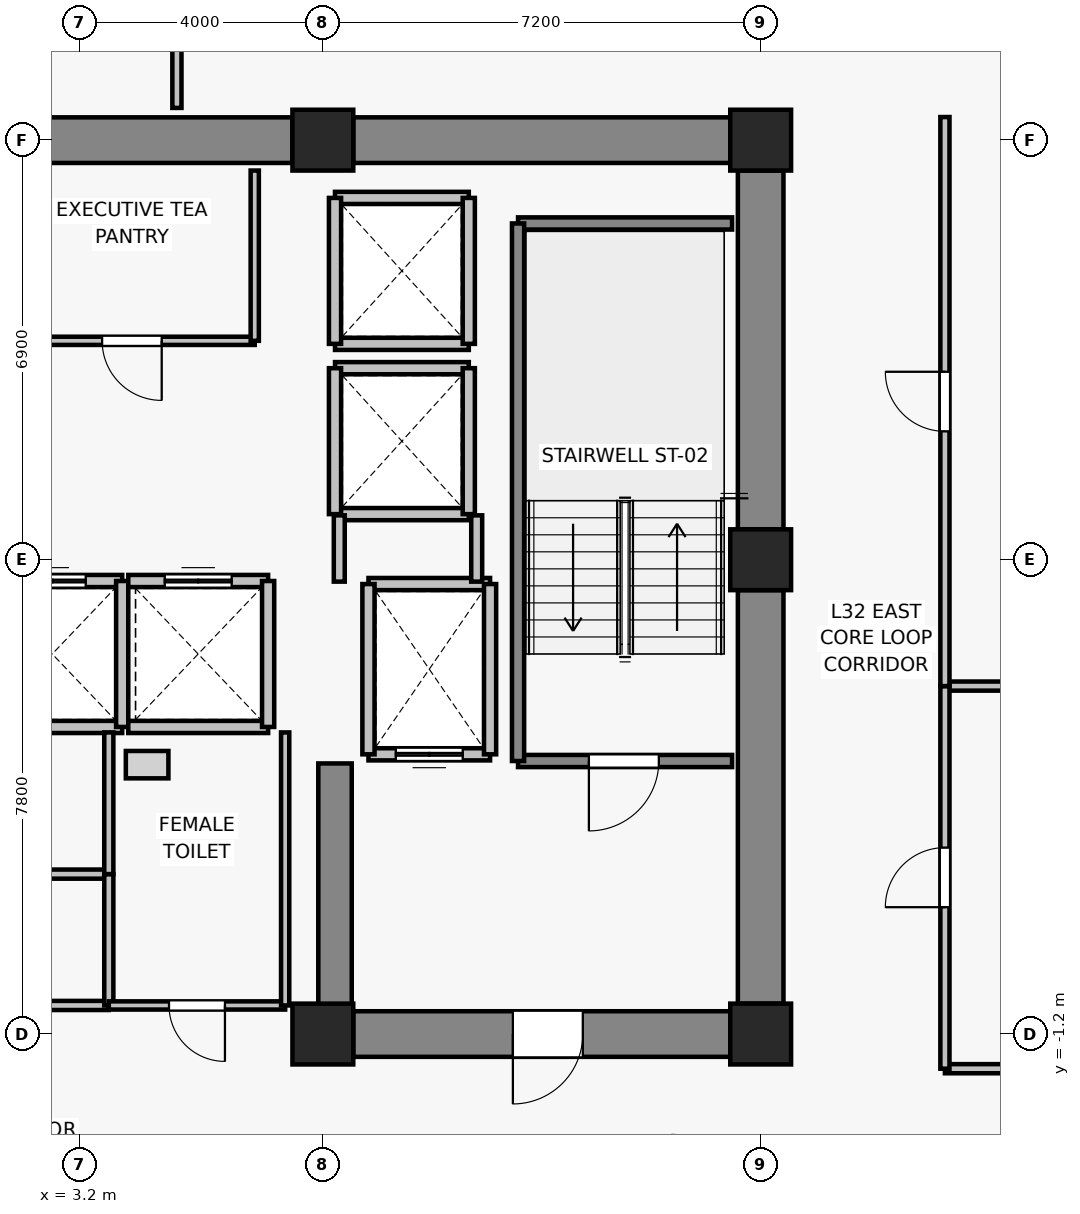
"""IFC4 building model, lengths in metres.
Left out: names, types, materials, properties, quantities, classifications, styles, units other than length and angle.
Written with IfcOpenShell. Run it as: python <this file> out.ifc"""

import sys

from ifc_helpers import new_model, si_unit, direction, frame, frame_2d, origin, origin_2d, place, context, subcontext, project, spatial, rectangle, extrude, source, transform, mapped, element, fill, save


model = new_model("IFC4")
c1 = context("Model", 3, precision=1e-05, world=origin(), true_north=direction((0.0, 1.0)))
c2 = subcontext(c1, "Body", "Model", "MODEL_VIEW")
j1 = project(units=[si_unit("LENGTHUNIT", "METRE"), si_unit("PLANEANGLEUNIT", "RADIAN")], contexts=[c1])
p1 = place(None, origin())
s1 = spatial("IfcSite", under=j1, at=p1, CompositionType="ELEMENT")
p2 = place(p1, origin())
s2 = spatial("IfcBuilding", under=s1, at=p2, CompositionType="ELEMENT")
p3 = place(p2, frame((0.0, 0.0, 116.5)))
s3 = spatial("IfcBuildingStorey", under=s2, at=p3, CompositionType="ELEMENT", Elevation=116.5)
for number, where, z_axis, x_axis in (
    (1, (7.2, -1.2, 0.0), (0.0, 0.0, 1.0), (1.0, 0.0, 0.0)),
    (2, (14.4, -1.2, 0.0), (0.0, 0.0, 1.0), (1.0, 0.0, 0.0)),
    (3, (14.4, 6.6, 0.0), (0.0, 0.0, 1.0), (1.0, 0.0, 0.0)),
    (4, (7.2, 13.5, 0.0), (0.0, 0.0, 1.0), (1.0, 0.0, 0.0)),
    (5, (14.4, 13.5, 0.0), (0.0, 0.0, 1.0), (1.0, 0.0, 0.0)),
):
    element("IfcColumn", number, at=place(p3, frame(where, z_axis=z_axis, x_axis=x_axis)), inside=s3, PredefinedType="COLUMN", context=c2, shape_type="SweptSolid", body=[
        extrude(rectangle(XDim=1.0, YDim=1.0, at=origin_2d()), origin(), (0.0, 0.0, 1.0), 3.3),
    ])
p4 = place(p3, frame((-6.7, 13.5, 0.0), z_axis=(0.0, 0.0, 1.0), x_axis=(1.0, 0.0, 0.0)))
e6 = element("IfcWall", 6, at=p4, inside=s3, PredefinedType="SHEAR", context=c2, shape_type="SweptSolid", body=[
    extrude(rectangle(XDim=13.4, YDim=0.75, at=frame_2d((6.7, 0.0))), origin(), (0.0, 0.0, 1.0), 3.075),
])
p5 = place(p3, frame((7.7, 13.5, 0.0), z_axis=(0.0, 0.0, 1.0), x_axis=(1.0, 0.0, 0.0)))
e7 = element("IfcWall", 7, at=p5, inside=s3, PredefinedType="SHEAR", context=c2, shape_type="SweptSolid", body=[
    extrude(rectangle(XDim=6.2, YDim=0.75, at=frame_2d((3.1, 0.0))), origin(), (0.0, 0.0, 1.0), 3.075),
])
p6 = place(p3, frame((14.4, -0.7, 0.0), z_axis=(0.0, 0.0, 1.0), x_axis=(0.0, 1.0, 0.0)))
e8 = element("IfcWall", 8, at=p6, inside=s3, PredefinedType="SHEAR", context=c2, shape_type="SweptSolid", body=[
    extrude(rectangle(XDim=6.8, YDim=0.75, at=frame_2d((3.4, 0.0))), origin(), (0.0, 0.0, 1.0), 3.075),
])
p7 = place(p3, frame((14.4, 7.1, 0.0), z_axis=(0.0, 0.0, 1.0), x_axis=(0.0, 1.0, 0.0)))
e9 = element("IfcWall", 9, at=p7, inside=s3, PredefinedType="SHEAR", context=c2, shape_type="SweptSolid", body=[
    extrude(rectangle(XDim=5.9, YDim=0.75, at=frame_2d((2.95, 0.0))), origin(), (0.0, 0.0, 1.0), 3.075),
])
p8 = place(p3, frame((13.9, -1.2, 0.0), z_axis=(0.0, 0.0, 1.0), x_axis=(-1.0, 0.0, 0.0)))
e10 = element("IfcWall", 10, at=p8, inside=s3, PredefinedType="SHEAR", context=c2, shape_type="SweptSolid", body=[
    extrude(rectangle(XDim=6.2, YDim=0.75, at=frame_2d((3.1, 0.0))), origin(), (0.0, 0.0, 1.0), 3.075),
])
p9 = place(p8, frame((2.425, 0.0, 0.0)))
e11 = element("IfcOpeningElement", 11, at=p9, cuts=e10, PredefinedType="OPENING", context=c2, shape_type="SweptSolid", body=[
    extrude(rectangle(XDim=1.15, YDim=2.15, at=frame_2d((0.575, 1.075))), frame((0.0, 0.385, 0.0), z_axis=(0.0, -1.0, 0.0), x_axis=(1.0, 0.0, 0.0)), (0.0, 0.0, 1.0), 0.77),
])
p10 = place(p3, frame((7.4, -0.825, 0.0), z_axis=(0.0, 0.0, 1.0), x_axis=(0.0, 1.0, 0.0)))
e12 = element("IfcWall", 12, at=p10, inside=s3, PredefinedType="SHEAR", context=c2, shape_type="SweptSolid", body=[
    extrude(rectangle(XDim=4.075, YDim=0.55, at=frame_2d((2.038, 0.0))), origin(), (0.0, 0.0, 1.0), 3.075),
])
p11 = place(p3, frame((9.95, 3.4, 0.0), z_axis=(0.0, 0.0, 1.0), x_axis=(-1.0, 0.0, 0.0)))
e13 = element("IfcWall", 13, at=p11, inside=s3, PredefinedType="SOLIDWALL", context=c2, shape_type="SweptSolid", body=[
    extrude(rectangle(XDim=2.0, YDim=0.2, at=frame_2d((1.0, 0.0))), origin(), (0.0, 0.0, 1.0), 3.075),
])
p12 = place(p11, frame((0.45, 0.0, 0.0)))
e14 = element("IfcOpeningElement", 14, at=p12, cuts=e13, PredefinedType="OPENING", context=c2, shape_type="SweptSolid", body=[
    extrude(rectangle(XDim=1.1, YDim=2.2, at=frame_2d((0.55, 1.1))), frame((0.0, 0.11, 0.0), z_axis=(0.0, -1.0, 0.0), x_axis=(1.0, 0.0, 0.0)), (0.0, 0.0, 1.0), 0.22),
])
p13 = place(p3, frame((7.95, 6.2, 0.0), z_axis=(0.0, 0.0, 1.0), x_axis=(1.0, 0.0, 0.0)))
e15 = element("IfcWall", 15, at=p13, inside=s3, PredefinedType="SOLIDWALL", context=c2, shape_type="SweptSolid", body=[
    extrude(rectangle(XDim=2.0, YDim=0.2, at=frame_2d((1.0, 0.0))), origin(), (0.0, 0.0, 1.0), 3.075),
])
for number, where, z_axis, x_axis in (
    (16, (7.95, 3.4, 0.0), (0.0, 0.0, 1.0), (0.0, 1.0, 0.0)),
    (17, (9.95, 6.2, 0.0), (0.0, 0.0, 1.0), (0.0, -1.0, 0.0)),
):
    element("IfcWall", number, at=place(p3, frame(where, z_axis=z_axis, x_axis=x_axis)), inside=s3, PredefinedType="SOLIDWALL", context=c2, shape_type="SweptSolid", body=[
        extrude(rectangle(XDim=2.8, YDim=0.2, at=frame_2d((1.4, 0.0))), origin(), (0.0, 0.0, 1.0), 3.075),
    ])
p14 = place(p3, frame((3.9, 3.85, 0.0), z_axis=(0.0, 0.0, 1.0), x_axis=(-1.0, 0.0, 0.0)))
e18 = element("IfcWall", 18, at=p14, inside=s3, PredefinedType="SOLIDWALL", context=c2, shape_type="SweptSolid", body=[
    extrude(rectangle(XDim=2.3, YDim=0.2, at=frame_2d((1.15, 0.0))), origin(), (0.0, 0.0, 1.0), 3.075),
])
p15 = place(p3, frame((1.6, 6.25, 0.0), z_axis=(0.0, 0.0, 1.0), x_axis=(1.0, 0.0, 0.0)))
e19 = element("IfcWall", 19, at=p15, inside=s3, PredefinedType="SOLIDWALL", context=c2, shape_type="SweptSolid", body=[
    extrude(rectangle(XDim=2.3, YDim=0.2, at=frame_2d((1.15, 0.0))), origin(), (0.0, 0.0, 1.0), 3.075),
])
p16 = place(p15, frame((0.6, 0.0, 0.0)))
e20 = element("IfcOpeningElement", 20, at=p16, cuts=e19, PredefinedType="OPENING", context=c2, shape_type="SweptSolid", body=[
    extrude(rectangle(XDim=1.1, YDim=2.2, at=frame_2d((0.55, 1.1))), frame((0.0, 0.11, 0.0), z_axis=(0.0, -1.0, 0.0), x_axis=(1.0, 0.0, 0.0)), (0.0, 0.0, 1.0), 0.22),
])
p17 = place(p3, frame((3.9, 6.25, 0.0), z_axis=(0.0, 0.0, 1.0), x_axis=(0.0, -1.0, 0.0)))
e21 = element("IfcWall", 21, at=p17, inside=s3, PredefinedType="SOLIDWALL", context=c2, shape_type="SweptSolid", body=[
    extrude(rectangle(XDim=2.4, YDim=0.2, at=frame_2d((1.2, 0.0))), origin(), (0.0, 0.0, 1.0), 3.075),
])
p18 = place(p3, frame((6.3, 3.85, 0.0), z_axis=(0.0, 0.0, 1.0), x_axis=(-1.0, 0.0, 0.0)))
e22 = element("IfcWall", 22, at=p18, inside=s3, PredefinedType="SOLIDWALL", context=c2, shape_type="SweptSolid", body=[
    extrude(rectangle(XDim=2.3, YDim=0.2, at=frame_2d((1.15, 0.0))), origin(), (0.0, 0.0, 1.0), 3.075),
])
p19 = place(p3, frame((4.0, 6.25, 0.0), z_axis=(0.0, 0.0, 1.0), x_axis=(1.0, 0.0, 0.0)))
e23 = element("IfcWall", 23, at=p19, inside=s3, PredefinedType="SOLIDWALL", context=c2, shape_type="SweptSolid", body=[
    extrude(rectangle(XDim=2.3, YDim=0.2, at=frame_2d((1.15, 0.0))), origin(), (0.0, 0.0, 1.0), 3.075),
])
p20 = place(p19, frame((0.6, 0.0, 0.0)))
e24 = element("IfcOpeningElement", 24, at=p20, cuts=e23, PredefinedType="OPENING", context=c2, shape_type="SweptSolid", body=[
    extrude(rectangle(XDim=1.1, YDim=2.2, at=frame_2d((0.55, 1.1))), frame((0.0, 0.11, 0.0), z_axis=(0.0, -1.0, 0.0), x_axis=(1.0, 0.0, 0.0)), (0.0, 0.0, 1.0), 0.22),
])
p21 = place(p3, frame((6.3, 6.25, 0.0), z_axis=(0.0, 0.0, 1.0), x_axis=(0.0, -1.0, 0.0)))
e25 = element("IfcWall", 25, at=p21, inside=s3, PredefinedType="SOLIDWALL", context=c2, shape_type="SweptSolid", body=[
    extrude(rectangle(XDim=2.4, YDim=0.2, at=frame_2d((1.2, 0.0))), origin(), (0.0, 0.0, 1.0), 3.075),
])
for number, where, z_axis, x_axis in (
    (26, (9.6, 7.35, 0.0), (0.0, 0.0, 1.0), (-1.0, 0.0, 0.0)),
    (27, (7.4, 9.75, 0.0), (0.0, 0.0, 1.0), (1.0, 0.0, 0.0)),
):
    element("IfcWall", number, at=place(p3, frame(where, z_axis=z_axis, x_axis=x_axis)), inside=s3, PredefinedType="SOLIDWALL", context=c2, shape_type="SweptSolid", body=[
        extrude(rectangle(XDim=2.2, YDim=0.2, at=frame_2d((1.1, 0.0))), origin(), (0.0, 0.0, 1.0), 2.515),
    ])
p22 = place(p3, frame((7.4, 7.35, 0.0), z_axis=(0.0, 0.0, 1.0), x_axis=(0.0, 1.0, 0.0)))
e28 = element("IfcWall", 28, at=p22, inside=s3, PredefinedType="SOLIDWALL", context=c2, shape_type="SweptSolid", body=[
    extrude(rectangle(XDim=2.4, YDim=0.2, at=frame_2d((1.2, 0.0))), origin(), (0.0, 0.0, 1.0), 2.515),
])
p23 = place(p3, frame((9.6, 9.75, 0.0), z_axis=(0.0, 0.0, 1.0), x_axis=(0.0, -1.0, 0.0)))
e29 = element("IfcWall", 29, at=p23, inside=s3, PredefinedType="SOLIDWALL", context=c2, shape_type="SweptSolid", body=[
    extrude(rectangle(XDim=2.4, YDim=0.2, at=frame_2d((1.2, 0.0))), origin(), (0.0, 0.0, 1.0), 3.075),
])
for number, where, z_axis, x_axis in (
    (30, (9.6, 10.15, 0.0), (0.0, 0.0, 1.0), (-1.0, 0.0, 0.0)),
    (31, (7.4, 12.55, 0.0), (0.0, 0.0, 1.0), (1.0, 0.0, 0.0)),
):
    element("IfcWall", number, at=place(p3, frame(where, z_axis=z_axis, x_axis=x_axis)), inside=s3, PredefinedType="SOLIDWALL", context=c2, shape_type="SweptSolid", body=[
        extrude(rectangle(XDim=2.2, YDim=0.2, at=frame_2d((1.1, 0.0))), origin(), (0.0, 0.0, 1.0), 2.515),
    ])
p24 = place(p3, frame((7.4, 10.15, 0.0), z_axis=(0.0, 0.0, 1.0), x_axis=(0.0, 1.0, 0.0)))
e32 = element("IfcWall", 32, at=p24, inside=s3, PredefinedType="SOLIDWALL", context=c2, shape_type="SweptSolid", body=[
    extrude(rectangle(XDim=2.4, YDim=0.2, at=frame_2d((1.2, 0.0))), origin(), (0.0, 0.0, 1.0), 2.515),
])
p25 = place(p3, frame((9.6, 12.55, 0.0), z_axis=(0.0, 0.0, 1.0), x_axis=(0.0, -1.0, 0.0)))
e33 = element("IfcWall", 33, at=p25, inside=s3, PredefinedType="SOLIDWALL", context=c2, shape_type="SweptSolid", body=[
    extrude(rectangle(XDim=2.4, YDim=0.2, at=frame_2d((1.2, 0.0))), origin(), (0.0, 0.0, 1.0), 3.075),
])
p26 = place(p3, frame((13.93, 3.29, 0.0), z_axis=(0.0, 0.0, 1.0), x_axis=(-1.0, 0.0, 0.0)))
e34 = element("IfcWall", 34, at=p26, inside=s3, PredefinedType="SOLIDWALL", context=c2, shape_type="SweptSolid", body=[
    extrude(rectangle(XDim=3.52, YDim=0.2, at=frame_2d((1.76, 0.0))), origin(), (0.0, 0.0, 1.0), 3.075),
])
p27 = place(p26, frame((1.205, 0.0, 0.0)))
e35 = element("IfcOpeningElement", 35, at=p27, cuts=e34, PredefinedType="OPENING", context=c2, shape_type="SweptSolid", body=[
    extrude(rectangle(XDim=1.15, YDim=2.15, at=frame_2d((0.575, 1.075))), frame((0.0, 0.11, 0.0), z_axis=(0.0, -1.0, 0.0), x_axis=(1.0, 0.0, 0.0)), (0.0, 0.0, 1.0), 0.22),
])
p28 = place(p3, frame((10.41, 12.13, 0.0), z_axis=(0.0, 0.0, 1.0), x_axis=(1.0, 0.0, 0.0)))
e36 = element("IfcWall", 36, at=p28, inside=s3, PredefinedType="SOLIDWALL", context=c2, shape_type="SweptSolid", body=[
    extrude(rectangle(XDim=3.52, YDim=0.2, at=frame_2d((1.76, 0.0))), origin(), (0.0, 0.0, 1.0), 3.075),
])
p29 = place(p3, frame((10.41, 3.29, 0.0), z_axis=(0.0, 0.0, 1.0), x_axis=(0.0, 1.0, 0.0)))
e37 = element("IfcWall", 37, at=p29, inside=s3, PredefinedType="SOLIDWALL", context=c2, shape_type="SweptSolid", body=[
    extrude(rectangle(XDim=8.84, YDim=0.2, at=frame_2d((4.42, 0.0))), origin(), (0.0, 0.0, 1.0), 3.075),
])
p30 = place(p3, frame((7.47, 6.24, 0.0), z_axis=(0.0, 0.0, 1.0), x_axis=(0.0, 1.0, 0.0)))
e38 = element("IfcWall", 38, at=p30, inside=s3, PredefinedType="PARTITIONING", context=c2, shape_type="SweptSolid", body=[
    extrude(rectangle(XDim=1.09, YDim=0.18, at=frame_2d((0.545, 0.0))), origin(), (0.0, 0.0, 1.0), 2.515),
])
p31 = place(p3, frame((9.73, 7.33, 0.0), z_axis=(0.0, 0.0, 1.0), x_axis=(0.0, -1.0, 0.0)))
e39 = element("IfcWall", 39, at=p31, inside=s3, PredefinedType="PARTITIONING", context=c2, shape_type="SweptSolid", body=[
    extrude(rectangle(XDim=1.09, YDim=0.18, at=frame_2d((0.545, 0.0))), origin(), (0.0, 0.0, 1.0), 3.075),
])
p32 = place(p3, frame((6.08, 10.2, 0.0), z_axis=(0.0, 0.0, 1.0), x_axis=(-1.0, 0.0, 0.0)))
e40 = element("IfcWall", 40, at=p32, inside=s3, PredefinedType="PARTITIONING", context=c2, shape_type="SweptSolid", body=[
    extrude(rectangle(XDim=4.04, YDim=0.135, at=frame_2d((2.02, 0.0))), origin(), (0.0, 0.0, 1.0), 3.075),
])
p33 = place(p32, frame((1.53, 0.0, 0.0)))
e41 = element("IfcOpeningElement", 41, at=p33, cuts=e40, PredefinedType="OPENING", context=c2, shape_type="SweptSolid", body=[
    extrude(rectangle(XDim=0.98, YDim=2.15, at=frame_2d((0.49, 1.075))), frame((0.0, 0.077, 0.0), z_axis=(0.0, -1.0, 0.0), x_axis=(1.0, 0.0, 0.0)), (0.0, 0.0, 1.0), 0.155),
])
p34 = place(p3, frame((6.08, 13.0, 0.0), z_axis=(0.0, 0.0, 1.0), x_axis=(0.0, -1.0, 0.0)))
e42 = element("IfcWall", 42, at=p34, inside=s3, PredefinedType="PARTITIONING", context=c2, shape_type="SweptSolid", body=[
    extrude(rectangle(XDim=2.8, YDim=0.135, at=frame_2d((1.4, 0.0))), origin(), (0.0, 0.0, 1.0), 3.075),
])
for number, where, z_axis, x_axis in (
    (43, (3.68, -0.73, 0.0), (0.0, 0.0, 1.0), (-1.0, 0.0, 0.0)),
    (44, (1.47, 1.43, 0.0), (0.0, 0.0, 1.0), (1.0, 0.0, 0.0)),
):
    element("IfcWall", number, at=place(p3, frame(where, z_axis=z_axis, x_axis=x_axis)), inside=s3, PredefinedType="PARTITIONING", context=c2, shape_type="SweptSolid", body=[
        extrude(rectangle(XDim=2.21, YDim=0.15, at=frame_2d((1.105, 0.0))), origin(), (0.0, 0.0, 1.0), 3.075),
    ])
p35 = place(p3, frame((3.68, 1.43, 0.0), z_axis=(0.0, 0.0, 1.0), x_axis=(0.0, -1.0, 0.0)))
e45 = element("IfcWall", 45, at=p35, inside=s3, PredefinedType="PARTITIONING", context=c2, shape_type="SweptSolid", body=[
    extrude(rectangle(XDim=2.16, YDim=0.15, at=frame_2d((1.08, 0.0))), origin(), (0.0, 0.0, 1.0), 3.075),
])
p36 = place(p3, frame((3.68, 3.76, 0.0), z_axis=(0.0, 0.0, 1.0), x_axis=(0.0, -1.0, 0.0)))
e46 = element("IfcWall", 46, at=p36, inside=s3, PredefinedType="PARTITIONING", context=c2, shape_type="SweptSolid", body=[
    extrude(rectangle(XDim=2.33, YDim=0.15, at=frame_2d((1.165, 0.0))), origin(), (0.0, 0.0, 1.0), 3.075),
])
p37 = place(p3, frame((6.58, -0.73, 0.0), z_axis=(0.0, 0.0, 1.0), x_axis=(-1.0, 0.0, 0.0)))
e47 = element("IfcWall", 47, at=p37, inside=s3, PredefinedType="PARTITIONING", context=c2, shape_type="SweptSolid", body=[
    extrude(rectangle(XDim=2.9, YDim=0.135, at=frame_2d((1.45, 0.0))), origin(), (0.0, 0.0, 1.0), 3.075),
])
p38 = place(p37, frame((0.99, 0.0, 0.0)))
e48 = element("IfcOpeningElement", 48, at=p38, cuts=e47, PredefinedType="OPENING", context=c2, shape_type="SweptSolid", body=[
    extrude(rectangle(XDim=0.92, YDim=2.1, at=frame_2d((0.46, 1.05))), frame((0.0, 0.077, 0.0), z_axis=(0.0, -1.0, 0.0), x_axis=(1.0, 0.0, 0.0)), (0.0, 0.0, 1.0), 0.155),
])
p39 = place(p3, frame((6.58, 3.76, 0.0), z_axis=(0.0, 0.0, 1.0), x_axis=(0.0, -1.0, 0.0)))
e49 = element("IfcWall", 49, at=p39, inside=s3, PredefinedType="PARTITIONING", context=c2, shape_type="SweptSolid", body=[
    extrude(rectangle(XDim=4.49, YDim=0.135, at=frame_2d((2.245, 0.0))), origin(), (0.0, 0.0, 1.0), 3.075),
])
for number, where, z_axis, x_axis in (
    (50, (29.53, -1.77, 0.0), (0.0, 0.0, 1.0), (-1.0, 0.0, 0.0)),
    (51, (17.43, 4.522, 0.0), (0.0, 0.0, 1.0), (1.0, 0.0, 0.0)),
):
    element("IfcWall", number, at=place(p3, frame(where, z_axis=z_axis, x_axis=x_axis)), inside=s3, PredefinedType="PARTITIONING", context=c2, shape_type="SweptSolid", body=[
        extrude(rectangle(XDim=12.1, YDim=0.15, at=frame_2d((6.05, 0.0))), origin(), (0.0, 0.0, 1.0), 2.515),
    ])
p40 = place(p3, frame((17.43, -1.77, 0.0), z_axis=(0.0, 0.0, 1.0), x_axis=(0.0, 1.0, 0.0)))
e52 = element("IfcWall", 52, at=p40, inside=s3, PredefinedType="PARTITIONING", context=c2, shape_type="SweptSolid", body=[
    extrude(rectangle(XDim=6.292, YDim=0.15, at=frame_2d((3.146, 0.0))), origin(), (0.0, 0.0, 1.0), 2.515),
])
p41 = place(p40, frame((2.656, 0.0, 0.0)))
e53 = element("IfcOpeningElement", 53, at=p41, cuts=e52, PredefinedType="OPENING", context=c2, shape_type="SweptSolid", body=[
    extrude(rectangle(XDim=0.98, YDim=2.15, at=frame_2d((0.49, 1.075))), frame((0.0, 0.085, 0.0), z_axis=(0.0, -1.0, 0.0), x_axis=(1.0, 0.0, 0.0)), (0.0, 0.0, 1.0), 0.17),
])
p42 = place(p3, frame((17.43, 4.522, 0.0), z_axis=(0.0, 0.0, 1.0), x_axis=(0.0, 1.0, 0.0)))
e54 = element("IfcWall", 54, at=p42, inside=s3, PredefinedType="PARTITIONING", context=c2, shape_type="SweptSolid", body=[
    extrude(rectangle(XDim=9.358, YDim=0.15, at=frame_2d((4.679, 0.0))), origin(), (0.0, 0.0, 1.0), 2.515),
])
p43 = place(p42, frame((4.189, 0.0, 0.0)))
e55 = element("IfcOpeningElement", 55, at=p43, cuts=e54, PredefinedType="OPENING", context=c2, shape_type="SweptSolid", body=[
    extrude(rectangle(XDim=0.98, YDim=2.15, at=frame_2d((0.49, 1.075))), frame((0.0, 0.085, 0.0), z_axis=(0.0, -1.0, 0.0), x_axis=(1.0, 0.0, 0.0)), (0.0, 0.0, 1.0), 0.17),
])
p44 = place(p3, frame((4.8, 17.63, 0.0), z_axis=(0.0, 0.0, 1.0), x_axis=(0.0, -1.0, 0.0)))
e56 = element("IfcWall", 56, at=p44, inside=s3, PredefinedType="PARTITIONING", context=c2, shape_type="SweptSolid", body=[
    extrude(rectangle(XDim=3.6, YDim=0.15, at=frame_2d((1.8, 0.0))), origin(), (0.0, 0.0, 1.0), 2.565),
])
m1 = source(origin(), c2, "Body", "SweptSolid", [
    extrude(rectangle(XDim=1.1, YDim=2.2, at=frame_2d((0.55, 1.1))), frame((0.0, 0.025, 0.0), z_axis=(0.0, -1.0, 0.0), x_axis=(1.0, 0.0, 0.0)), (0.0, 0.0, 1.0), 0.05),
])
p45 = place(p12, origin())
e57 = element("IfcDoor", 57, at=p45, inside=s3, OperationType="DOUBLE_DOOR_SLIDING", PredefinedType="DOOR", context=c2, shape_type="MappedRepresentation", body=[
    mapped(m1, transform((0.0, 0.0, 0.0), x_axis=(1.0, 0.0, 0.0), y_axis=(0.0, 1.0, 0.0), z_axis=(0.0, 0.0, 1.0), scale=1.0)),
])
fill(e14, e57)
p46 = place(p16, origin())
e58 = element("IfcDoor", 58, at=p46, inside=s3, OperationType="DOUBLE_DOOR_SLIDING", PredefinedType="DOOR", context=c2, shape_type="MappedRepresentation", body=[
    mapped(m1, transform((0.0, 0.0, 0.0), x_axis=(1.0, 0.0, 0.0), y_axis=(0.0, 1.0, 0.0), z_axis=(0.0, 0.0, 1.0), scale=1.0)),
])
fill(e20, e58)
p47 = place(p20, origin())
e59 = element("IfcDoor", 59, at=p47, inside=s3, OperationType="DOUBLE_DOOR_SLIDING", PredefinedType="DOOR", context=c2, shape_type="MappedRepresentation", body=[
    mapped(m1, transform((0.0, 0.0, 0.0), x_axis=(1.0, 0.0, 0.0), y_axis=(0.0, 1.0, 0.0), z_axis=(0.0, 0.0, 1.0), scale=1.0)),
])
fill(e24, e59)
m2 = source(origin(), c2, "Body", "SweptSolid", [
    extrude(rectangle(XDim=1.15, YDim=2.15, at=frame_2d((0.575, 1.075))), frame((0.0, 0.025, 0.0), z_axis=(0.0, -1.0, 0.0), x_axis=(1.0, 0.0, 0.0)), (0.0, 0.0, 1.0), 0.05),
])
p48 = place(p27, origin())
e60 = element("IfcDoor", 60, at=p48, inside=s3, OperationType="SINGLE_SWING_RIGHT", PredefinedType="DOOR", context=c2, shape_type="MappedRepresentation", body=[
    mapped(m2, transform((0.0, 0.0, 0.0), x_axis=(1.0, 0.0, 0.0), y_axis=(0.0, 1.0, 0.0), z_axis=(0.0, 0.0, 1.0), scale=1.0)),
])
fill(e35, e60)
p49 = place(p9, origin())
e61 = element("IfcDoor", 61, at=p49, inside=s3, OperationType="SINGLE_SWING_RIGHT", PredefinedType="DOOR", context=c2, shape_type="MappedRepresentation", body=[
    mapped(m2, transform((0.0, 0.0, 0.0), x_axis=(1.0, 0.0, 0.0), y_axis=(0.0, 1.0, 0.0), z_axis=(0.0, 0.0, 1.0), scale=1.0)),
])
fill(e11, e61)
m3 = source(origin(), c2, "Body", "SweptSolid", [
    extrude(rectangle(XDim=0.98, YDim=2.15, at=frame_2d((0.49, 1.075))), frame((0.0, 0.025, 0.0), z_axis=(0.0, -1.0, 0.0), x_axis=(1.0, 0.0, 0.0)), (0.0, 0.0, 1.0), 0.05),
])
p50 = place(p33, origin())
e62 = element("IfcDoor", 62, at=p50, inside=s3, OperationType="SINGLE_SWING_LEFT", PredefinedType="DOOR", context=c2, shape_type="MappedRepresentation", body=[
    mapped(m3, transform((0.0, 0.0, 0.0), x_axis=(1.0, 0.0, 0.0), y_axis=(0.0, 1.0, 0.0), z_axis=(0.0, 0.0, 1.0), scale=1.0)),
])
fill(e41, e62)
m4 = source(origin(), c2, "Body", "SweptSolid", [
    extrude(rectangle(XDim=0.92, YDim=2.1, at=frame_2d((0.46, 1.05))), frame((0.0, 0.025, 0.0), z_axis=(0.0, -1.0, 0.0), x_axis=(1.0, 0.0, 0.0)), (0.0, 0.0, 1.0), 0.05),
])
p51 = place(p38, origin())
e63 = element("IfcDoor", 63, at=p51, inside=s3, OperationType="SINGLE_SWING_LEFT", PredefinedType="DOOR", context=c2, shape_type="MappedRepresentation", body=[
    mapped(m4, transform((0.0, 0.0, 0.0), x_axis=(1.0, 0.0, 0.0), y_axis=(0.0, 1.0, 0.0), z_axis=(0.0, 0.0, 1.0), scale=1.0)),
])
fill(e48, e63)
p52 = place(p41, origin())
e64 = element("IfcDoor", 64, at=p52, inside=s3, OperationType="SINGLE_SWING_LEFT", PredefinedType="DOOR", context=c2, shape_type="MappedRepresentation", body=[
    mapped(m3, transform((0.0, 0.0, 0.0), x_axis=(1.0, 0.0, 0.0), y_axis=(0.0, 1.0, 0.0), z_axis=(0.0, 0.0, 1.0), scale=1.0)),
])
fill(e53, e64)
p53 = place(p43, origin())
e65 = element("IfcDoor", 65, at=p53, inside=s3, OperationType="SINGLE_SWING_RIGHT", PredefinedType="DOOR", context=c2, shape_type="MappedRepresentation", body=[
    mapped(m3, transform((0.0, 0.0, 0.0), x_axis=(1.0, 0.0, 0.0), y_axis=(0.0, 1.0, 0.0), z_axis=(0.0, 0.0, 1.0), scale=1.0)),
])
fill(e55, e65)
save(model, sys.argv[1])
